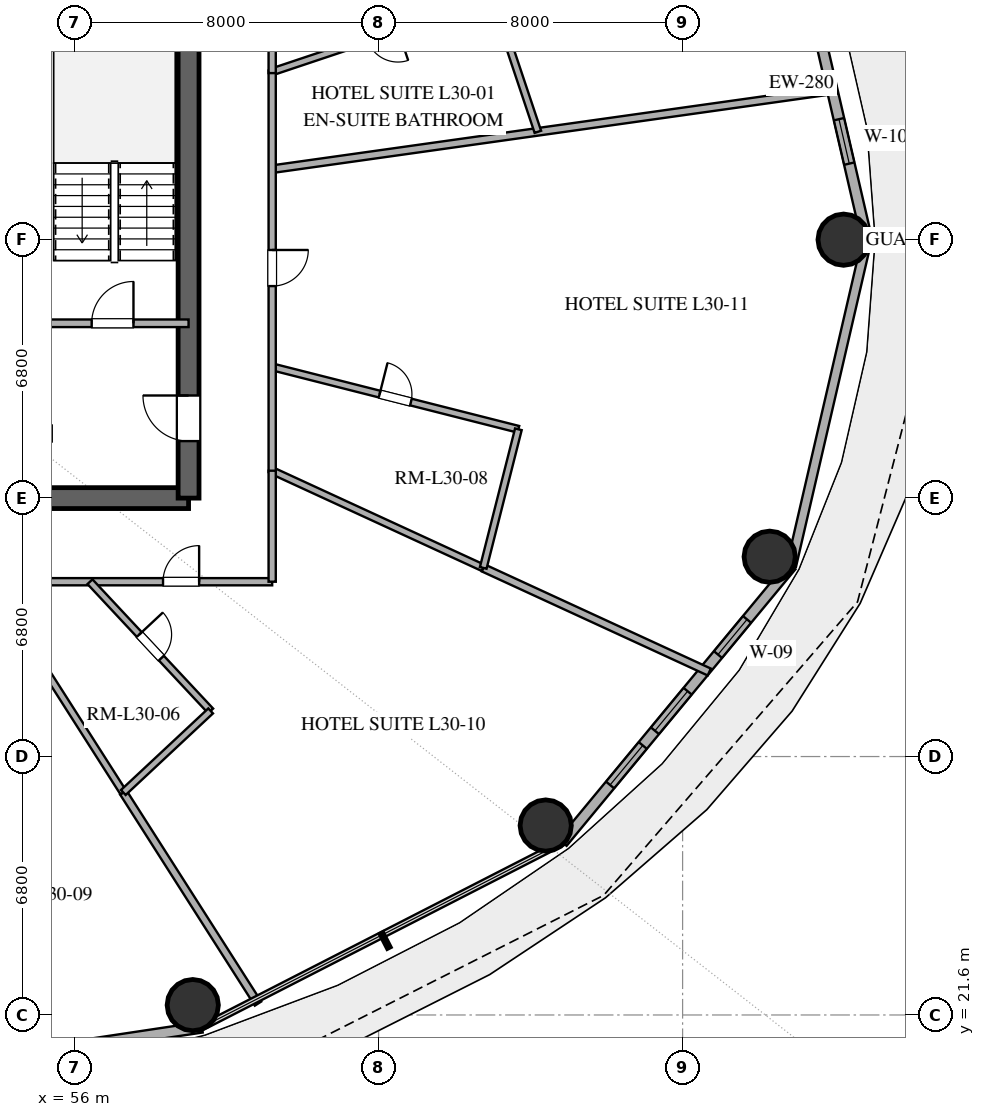
"""IFC4 building model, lengths in metres.
Left out: names, types, materials, properties, quantities, classifications, styles, units other than length and angle.
Written with IfcOpenShell. Run it as: python <this file> out.ifc"""

import sys

from ifc_helpers import new_model, si_unit, direction, frame, frame_2d, origin, origin_2d, place, context, subcontext, project, spatial, rectangle, hollow_circle, extrude, element, fill, save


model = new_model("IFC4")
c1 = context("Model", 3, precision=1e-05, world=origin(), true_north=direction((0.0, 1.0)))
c2 = subcontext(c1, "Body", "Model", "MODEL_VIEW")
j1 = project(units=[si_unit("LENGTHUNIT", "METRE"), si_unit("PLANEANGLEUNIT", "RADIAN")], contexts=[c1])
p1 = place(None, origin())
s1 = spatial("IfcSite", under=j1, at=p1, CompositionType="ELEMENT")
p2 = place(p1, origin())
s2 = spatial("IfcBuilding", under=s1, at=p2, CompositionType="ELEMENT")
p3 = place(p2, frame((0.0, 0.0, 120.0)))
s3 = spatial("IfcBuildingStorey", under=s2, at=p3, CompositionType="ELEMENT", Elevation=120.0)
p4 = place(p3, frame((55.0, 35.2, 0.0), z_axis=(0.0, 0.0, 1.0), x_axis=(1.0, 0.0, 0.0)))
e1 = element("IfcWall", 1, at=p4, inside=s3, PredefinedType="SHEAR", context=c2, shape_type="SweptSolid", body=[
    extrude(rectangle(XDim=4.0, YDim=0.55, at=frame_2d((2.0, 0.0))), origin(), (0.0, 0.0, 1.0), 3.38),
])
p5 = place(p3, frame((59.0, 35.2, 0.0), z_axis=(0.0, 0.0, 1.0), x_axis=(0.0, 1.0, 0.0)))
e2 = element("IfcWall", 2, at=p5, inside=s3, PredefinedType="SHEAR", context=c2, shape_type="SweptSolid", body=[
    extrude(rectangle(XDim=13.6, YDim=0.55, at=frame_2d((6.8, 0.0))), origin(), (0.0, 0.0, 1.0), 3.38),
])
p6 = place(p5, frame((1.5, 0.0, 0.0)))
e3 = element("IfcOpeningElement", 3, at=p6, cuts=e2, PredefinedType="OPENING", context=c2, shape_type="SweptSolid", body=[
    extrude(rectangle(XDim=1.2, YDim=2.15, at=frame_2d((0.6, 1.075))), frame((0.0, 0.285, 0.0), z_axis=(0.0, -1.0, 0.0), x_axis=(1.0, 0.0, 0.0)), (0.0, 0.0, 1.0), 0.57),
])
for number, where, z_axis, x_axis in (
    (4, (76.237, 42.0, 0.0), (0.0, 0.0, 1.0), (1.0, 0.0, 0.0)),
    (5, (59.11, 21.859, 0.0), (0.0, 0.0, 1.0), (1.0, 0.0, 0.0)),
    (6, (68.398, 26.585, 0.0), (0.0, 0.0, 1.0), (1.0, 0.0, 0.0)),
    (7, (74.291, 33.657, 0.0), (0.0, 0.0, 1.0), (1.0, 0.0, 0.0)),
):
    element("IfcColumn", number, at=place(p3, frame(where, z_axis=z_axis, x_axis=x_axis)), inside=s3, PredefinedType="COLUMN", context=c2, shape_type="SweptSolid", body=[
        extrude(hollow_circle(Radius=0.675, WallThickness=0.036, at=origin_2d()), origin(), (0.0, 0.0, 1.0), 3.38),
    ])
p7 = place(p3, frame((76.849, 42.0, 0.0), z_axis=(0.0, 0.0, 1.0), x_axis=(-0.22558597182, 0.974223264616, 0.0)))
e8 = element("IfcWall", 8, at=p7, inside=s3, PredefinedType="SOLIDWALL", context=c2, shape_type="SweptSolid", body=[
    extrude(rectangle(XDim=8.811, YDim=0.28, at=frame_2d((4.405, 0.0))), origin(), (0.0, 0.0, 1.0), 3.38),
])
p8 = place(p7, frame((2.054, 0.0, 0.85)))
e9 = element("IfcOpeningElement", 9, at=p8, cuts=e8, PredefinedType="OPENING", context=c2, shape_type="SweptSolid", body=[
    extrude(rectangle(XDim=1.2, YDim=1.6, at=frame_2d((0.6, 0.8))), frame((0.0, 0.15, 0.0), z_axis=(0.0, -1.0, 0.0), x_axis=(1.0, 0.0, 0.0)), (0.0, 0.0, 1.0), 0.3),
])
p9 = place(p7, frame((6.175, 0.0, 0.0)))
e10 = element("IfcOpeningElement", 10, at=p9, cuts=e8, PredefinedType="OPENING", context=c2, shape_type="SweptSolid", body=[
    extrude(rectangle(XDim=1.1, YDim=2.25, at=frame_2d((0.55, 1.125))), frame((0.0, 0.15, 0.0), z_axis=(0.0, -1.0, 0.0), x_axis=(1.0, 0.0, 0.0)), (0.0, 0.0, 1.0), 0.3),
])
p10 = place(p3, frame((48.0, 19.57, 0.0), z_axis=(0.0, 0.0, 1.0), x_axis=(0.988877774656, 0.148730450117, 0.0)))
e11 = element("IfcWall", 11, at=p10, inside=s3, PredefinedType="SOLIDWALL", context=c2, shape_type="SweptSolid", body=[
    extrude(rectangle(XDim=11.479, YDim=0.28, at=frame_2d((5.74, 0.0))), origin(), (0.0, 0.0, 1.0), 3.38),
])
p11 = place(p10, frame((1.524, 0.0, 0.0)))
e12 = element("IfcOpeningElement", 12, at=p11, cuts=e11, PredefinedType="OPENING", context=c2, shape_type="SweptSolid", body=[
    extrude(rectangle(XDim=1.4, YDim=2.2, at=frame_2d((0.7, 1.1))), frame((0.0, 0.15, 0.0), z_axis=(0.0, -1.0, 0.0), x_axis=(1.0, 0.0, 0.0)), (0.0, 0.0, 1.0), 0.3),
])
p12 = place(p3, frame((68.84, 26.14, 0.0), z_axis=(0.0, 0.0, 1.0), x_axis=(0.637505817448, 0.770445541696, 0.0)))
e13 = element("IfcWall", 13, at=p12, inside=s3, PredefinedType="SOLIDWALL", context=c2, shape_type="SweptSolid", body=[
    extrude(rectangle(XDim=9.445, YDim=0.28, at=frame_2d((4.723, 0.0))), origin(), (0.0, 0.0, 1.0), 3.38),
])
p13 = place(p12, frame((1.963, 0.0, 0.85)))
e14 = element("IfcOpeningElement", 14, at=p13, cuts=e13, PredefinedType="OPENING", context=c2, shape_type="SweptSolid", body=[
    extrude(rectangle(XDim=1.35, YDim=1.8, at=frame_2d((0.675, 0.9))), frame((0.0, 0.15, 0.0), z_axis=(0.0, -1.0, 0.0), x_axis=(1.0, 0.0, 0.0)), (0.0, 0.0, 1.0), 0.3),
])
p14 = place(p12, frame((3.815, 0.0, 0.85)))
e15 = element("IfcOpeningElement", 15, at=p14, cuts=e13, PredefinedType="OPENING", context=c2, shape_type="SweptSolid", body=[
    extrude(rectangle(XDim=1.35, YDim=1.8, at=frame_2d((0.675, 0.9))), frame((0.0, 0.15, 0.0), z_axis=(0.0, -1.0, 0.0), x_axis=(1.0, 0.0, 0.0)), (0.0, 0.0, 1.0), 0.3),
])
p15 = place(p12, frame((6.417, 0.0, 0.85)))
e16 = element("IfcOpeningElement", 16, at=p15, cuts=e13, PredefinedType="OPENING", context=c2, shape_type="SweptSolid", body=[
    extrude(rectangle(XDim=1.2, YDim=1.8, at=frame_2d((0.6, 0.9))), frame((0.0, 0.15, 0.0), z_axis=(0.0, -1.0, 0.0), x_axis=(1.0, 0.0, 0.0)), (0.0, 0.0, 1.0), 0.3),
])
p16 = place(p3, frame((74.861, 33.417, 0.0), z_axis=(0.0, 0.0, 1.0), x_axis=(0.22558597182, 0.974223264616, 0.0)))
e17 = element("IfcWall", 17, at=p16, inside=s3, PredefinedType="SOLIDWALL", context=c2, shape_type="SweptSolid", body=[
    extrude(rectangle(XDim=8.811, YDim=0.25, at=frame_2d((4.405, 0.0))), origin(), (0.0, 0.0, 1.0), 3.38),
])
p17 = place(p3, frame((55.0, 39.8, 0.0), z_axis=(0.0, 0.0, 1.0), x_axis=(1.0, 0.0, 0.0)))
e18 = element("IfcWall", 18, at=p17, inside=s3, PredefinedType="SOLIDWALL", context=c2, shape_type="SweptSolid", body=[
    extrude(rectangle(XDim=4.0, YDim=0.2, at=frame_2d((2.0, 0.0))), origin(), (0.0, 0.0, 1.0), 2.74),
])
p18 = place(p17, frame((1.45, 0.0, 0.0)))
e19 = element("IfcOpeningElement", 19, at=p18, cuts=e18, PredefinedType="OPENING", context=c2, shape_type="SweptSolid", body=[
    extrude(rectangle(XDim=1.1, YDim=2.15, at=frame_2d((0.55, 1.075))), frame((0.0, 0.11, 0.0), z_axis=(0.0, -1.0, 0.0), x_axis=(1.0, 0.0, 0.0)), (0.0, 0.0, 1.0), 0.22),
])
p19 = place(p3, frame((61.2, 43.855, 0.0), z_axis=(0.0, 0.0, 1.0), x_axis=(0.990266848234, 0.139181785048, 0.0)))
e20 = element("IfcWall", 20, at=p19, inside=s3, PredefinedType="PARTITIONING", context=c2, shape_type="SweptSolid", body=[
    extrude(rectangle(XDim=15.005, YDim=0.2, at=frame_2d((7.502, 0.0))), origin(), (0.0, 0.0, 1.0), 2.74),
])
p20 = place(p3, frame((61.2, 38.653, 0.0), z_axis=(0.0, 0.0, 1.0), x_axis=(0.96932048276, -0.24580032893, 0.0)))
e21 = element("IfcWall", 21, at=p20, inside=s3, PredefinedType="PLUMBINGWALL", context=c2, shape_type="SweptSolid", body=[
    extrude(rectangle(XDim=6.684, YDim=0.18, at=frame_2d((3.342, 0.0))), origin(), (0.0, 0.0, 1.0), 2.74),
])
p21 = place(p20, frame((2.917, 0.0, 0.0)))
e22 = element("IfcOpeningElement", 22, at=p21, cuts=e21, PredefinedType="OPENING", context=c2, shape_type="SweptSolid", body=[
    extrude(rectangle(XDim=0.85, YDim=2.1, at=frame_2d((0.425, 1.05))), frame((0.0, 0.1, 0.0), z_axis=(0.0, -1.0, 0.0), x_axis=(1.0, 0.0, 0.0)), (0.0, 0.0, 1.0), 0.2),
])
p22 = place(p3, frame((60.828, 21.9, 0.0), z_axis=(0.0, 0.0, 1.0), x_axis=(-0.537968238966, 0.842965108331, 0.0)))
e23 = element("IfcWall", 23, at=p22, inside=s3, PredefinedType="PARTITIONING", context=c2, shape_type="SweptSolid", body=[
    extrude(rectangle(XDim=6.589, YDim=0.2, at=frame_2d((3.295, 0.0))), origin(), (0.0, 0.0, 1.0), 2.74),
])
p23 = place(p3, frame((57.283, 27.454, 0.0), z_axis=(0.0, 0.0, 1.0), x_axis=(-0.537984400251, 0.842954794213, 0.0)))
e24 = element("IfcWall", 24, at=p23, inside=s3, PredefinedType="PLUMBINGWALL", context=c2, shape_type="SweptSolid", body=[
    extrude(rectangle(XDim=6.579, YDim=0.18, at=frame_2d((3.29, 0.0))), origin(), (0.0, 0.0, 1.0), 2.74),
])
p24 = place(p3, frame((72.701, 30.624, 0.0), z_axis=(0.0, 0.0, 1.0), x_axis=(-0.9083071886, 0.418303778536, 0.0)))
e25 = element("IfcWall", 25, at=p24, inside=s3, PredefinedType="PARTITIONING", context=c2, shape_type="SweptSolid", body=[
    extrude(rectangle(XDim=6.548, YDim=0.2, at=frame_2d((3.274, 0.0))), origin(), (0.0, 0.0, 1.0), 2.74),
])
p25 = place(p3, frame((67.012, 48.361, 0.0), z_axis=(0.0, 0.0, 1.0), x_axis=(-0.948332174456, -0.317279193915, 0.0)))
e26 = element("IfcWall", 26, at=p25, inside=s3, PredefinedType="PLUMBINGWALL", context=c2, shape_type="SweptSolid", body=[
    extrude(rectangle(XDim=6.129, YDim=0.18, at=frame_2d((3.064, 0.0))), origin(), (0.0, 0.0, 1.0), 2.74),
])
p26 = place(p25, frame((2.639, 0.0, 0.0)))
e27 = element("IfcOpeningElement", 27, at=p26, cuts=e26, PredefinedType="OPENING", context=c2, shape_type="SweptSolid", body=[
    extrude(rectangle(XDim=0.85, YDim=2.1, at=frame_2d((0.425, 1.05))), frame((0.0, 0.1, 0.0), z_axis=(0.0, -1.0, 0.0), x_axis=(1.0, 0.0, 0.0)), (0.0, 0.0, 1.0), 0.2),
])
p27 = place(p3, frame((66.754, 33.363, 0.0), z_axis=(0.0, 0.0, 1.0), x_axis=(-0.908301480607, 0.418316172681, 0.0)))
e28 = element("IfcWall", 28, at=p27, inside=s3, PredefinedType="PLUMBINGWALL", context=c2, shape_type="SweptSolid", body=[
    extrude(rectangle(XDim=6.115, YDim=0.18, at=frame_2d((3.057, 0.0))), origin(), (0.0, 0.0, 1.0), 2.74),
])
p28 = place(p3, frame((61.2, 46.45, 0.0), z_axis=(0.0, 0.0, 1.0), x_axis=(0.0, -1.0, 0.0)))
e29 = element("IfcWall", 29, at=p28, inside=s3, PredefinedType="PARTITIONING", context=c2, shape_type="SweptSolid", body=[
    extrude(rectangle(XDim=10.564, YDim=0.19, at=frame_2d((5.282, 0.0))), origin(), (0.0, 0.0, 1.0), 2.74),
])
p29 = place(p28, frame((4.722, 0.0, 0.0)))
e30 = element("IfcOpeningElement", 30, at=p29, cuts=e29, PredefinedType="OPENING", context=c2, shape_type="SweptSolid", body=[
    extrude(rectangle(XDim=0.95, YDim=2.15, at=frame_2d((0.475, 1.075))), frame((0.0, 0.105, 0.0), z_axis=(0.0, -1.0, 0.0), x_axis=(1.0, 0.0, 0.0)), (0.0, 0.0, 1.0), 0.21),
])
p30 = place(p3, frame((53.706, 33.0, 0.0), z_axis=(0.0, 0.0, 1.0), x_axis=(1.0, 0.0, 0.0)))
e31 = element("IfcWall", 31, at=p30, inside=s3, PredefinedType="PARTITIONING", context=c2, shape_type="SweptSolid", body=[
    extrude(rectangle(XDim=7.494, YDim=0.19, at=frame_2d((3.747, 0.0))), origin(), (0.0, 0.0, 1.0), 2.74),
])
p31 = place(p30, frame((4.622, 0.0, 0.0)))
e32 = element("IfcOpeningElement", 32, at=p31, cuts=e31, PredefinedType="OPENING", context=c2, shape_type="SweptSolid", body=[
    extrude(rectangle(XDim=0.95, YDim=2.15, at=frame_2d((0.475, 1.075))), frame((0.0, 0.105, 0.0), z_axis=(0.0, -1.0, 0.0), x_axis=(1.0, 0.0, 0.0)), (0.0, 0.0, 1.0), 0.21),
])
p32 = place(p3, frame((56.406, 33.0, 0.0), z_axis=(0.0, 0.0, 1.0), x_axis=(0.682578142961, -0.730812615348, 0.0)))
e33 = element("IfcWall", 33, at=p32, inside=s3, PredefinedType="PLUMBINGWALL", context=c2, shape_type="SweptSolid", body=[
    extrude(rectangle(XDim=4.652, YDim=0.18, at=frame_2d((2.326, 0.0))), origin(), (0.0, 0.0, 1.0), 2.74),
])
p33 = place(p32, frame((1.901, 0.0, 0.0)))
e34 = element("IfcOpeningElement", 34, at=p33, cuts=e33, PredefinedType="OPENING", context=c2, shape_type="SweptSolid", body=[
    extrude(rectangle(XDim=0.85, YDim=2.1, at=frame_2d((0.425, 1.05))), frame((0.0, 0.1, 0.0), z_axis=(0.0, -1.0, 0.0), x_axis=(1.0, 0.0, 0.0)), (0.0, 0.0, 1.0), 0.2),
])
p34 = place(p3, frame((61.2, 51.0, 0.0), z_axis=(0.0, 0.0, 1.0), x_axis=(0.0, -1.0, 0.0)))
e35 = element("IfcWall", 35, at=p34, inside=s3, PredefinedType="PARTITIONING", context=c2, shape_type="SweptSolid", body=[
    extrude(rectangle(XDim=4.617, YDim=0.19, at=frame_2d((2.309, 0.0))), origin(), (0.0, 0.0, 1.0), 2.74),
])
p35 = place(p34, frame((1.833, 0.0, 0.0)))
e36 = element("IfcOpeningElement", 36, at=p35, cuts=e35, PredefinedType="OPENING", context=c2, shape_type="SweptSolid", body=[
    extrude(rectangle(XDim=0.95, YDim=2.15, at=frame_2d((0.475, 1.075))), frame((0.0, 0.105, 0.0), z_axis=(0.0, -1.0, 0.0), x_axis=(1.0, 0.0, 0.0)), (0.0, 0.0, 1.0), 0.21),
])
p36 = place(p3, frame((67.678, 37.01, 0.0), z_axis=(0.0, 0.0, 1.0), x_axis=(-0.245725202551, -0.969339530212, 0.0)))
e37 = element("IfcWall", 37, at=p36, inside=s3, PredefinedType="PLUMBINGWALL", context=c2, shape_type="SweptSolid", body=[
    extrude(rectangle(XDim=3.763, YDim=0.18, at=frame_2d((1.881, 0.0))), origin(), (0.0, 0.0, 1.0), 2.74),
])
p37 = place(p3, frame((68.191, 44.838, 0.0), z_axis=(0.0, 0.0, 1.0), x_axis=(-0.317291996527, 0.948327891048, 0.0)))
e38 = element("IfcWall", 38, at=p37, inside=s3, PredefinedType="PLUMBINGWALL", context=c2, shape_type="SweptSolid", body=[
    extrude(rectangle(XDim=3.716, YDim=0.18, at=frame_2d((1.858, 0.0))), origin(), (0.0, 0.0, 1.0), 2.74),
])
p38 = place(p3, frame((59.581, 29.601, 0.0), z_axis=(0.0, 0.0, 1.0), x_axis=(-0.730840933831, -0.682547822088, 0.0)))
e39 = element("IfcWall", 39, at=p38, inside=s3, PredefinedType="PLUMBINGWALL", context=c2, shape_type="SweptSolid", body=[
    extrude(rectangle(XDim=3.145, YDim=0.18, at=frame_2d((1.572, 0.0))), origin(), (0.0, 0.0, 1.0), 2.74),
])
p39 = place(p3, frame((61.2, 33.0, 0.0), z_axis=(0.0, 0.0, 1.0), x_axis=(0.0, 1.0, 0.0)))
e40 = element("IfcWall", 40, at=p39, inside=s3, PredefinedType="PARTITIONING", context=c2, shape_type="SweptSolid", body=[
    extrude(rectangle(XDim=2.921, YDim=0.19, at=frame_2d((1.46, 0.0))), origin(), (0.0, 0.0, 1.0), 2.74),
])
p40 = place(p8, origin())
e41 = element("IfcWindow", 41, at=p40, inside=s3, PartitioningType="SINGLE_PANEL", PredefinedType="WINDOW", context=c2, shape_type="SweptSolid", body=[
    extrude(rectangle(XDim=1.2, YDim=1.6, at=frame_2d((0.6, 0.8))), frame((0.0, 0.03, 0.0), z_axis=(0.0, -1.0, 0.0), x_axis=(1.0, 0.0, 0.0)), (0.0, 0.0, 1.0), 0.06),
])
fill(e9, e41)
p41 = place(p13, origin())
e42 = element("IfcWindow", 42, at=p41, inside=s3, PartitioningType="SINGLE_PANEL", PredefinedType="WINDOW", context=c2, shape_type="SweptSolid", body=[
    extrude(rectangle(XDim=1.35, YDim=1.8, at=frame_2d((0.675, 0.9))), frame((0.0, 0.03, 0.0), z_axis=(0.0, -1.0, 0.0), x_axis=(1.0, 0.0, 0.0)), (0.0, 0.0, 1.0), 0.06),
])
fill(e14, e42)
p42 = place(p14, origin())
e43 = element("IfcWindow", 43, at=p42, inside=s3, PartitioningType="SINGLE_PANEL", PredefinedType="WINDOW", context=c2, shape_type="SweptSolid", body=[
    extrude(rectangle(XDim=1.35, YDim=1.8, at=frame_2d((0.675, 0.9))), frame((0.0, 0.03, 0.0), z_axis=(0.0, -1.0, 0.0), x_axis=(1.0, 0.0, 0.0)), (0.0, 0.0, 1.0), 0.06),
])
fill(e15, e43)
p43 = place(p15, origin())
e44 = element("IfcWindow", 44, at=p43, inside=s3, PartitioningType="SINGLE_PANEL", PredefinedType="WINDOW", context=c2, shape_type="SweptSolid", body=[
    extrude(rectangle(XDim=1.2, YDim=1.8, at=frame_2d((0.6, 0.9))), frame((0.0, 0.03, 0.0), z_axis=(0.0, -1.0, 0.0), x_axis=(1.0, 0.0, 0.0)), (0.0, 0.0, 1.0), 0.06),
])
fill(e16, e44)
p44 = place(p6, origin())
e45 = element("IfcDoor", 45, at=p44, inside=s3, OperationType="SINGLE_SWING_RIGHT", PredefinedType="DOOR", context=c2, shape_type="SweptSolid", body=[
    extrude(rectangle(XDim=1.2, YDim=2.15, at=frame_2d((0.6, 1.075))), frame((0.0, 0.025, 0.0), z_axis=(0.0, -1.0, 0.0), x_axis=(1.0, 0.0, 0.0)), (0.0, 0.0, 1.0), 0.05),
])
fill(e3, e45)
p45 = place(p18, origin())
e46 = element("IfcDoor", 46, at=p45, inside=s3, OperationType="SINGLE_SWING_RIGHT", PredefinedType="DOOR", context=c2, shape_type="SweptSolid", body=[
    extrude(rectangle(XDim=1.1, YDim=2.15, at=frame_2d((0.55, 1.075))), frame((0.0, 0.025, 0.0), z_axis=(0.0, -1.0, 0.0), x_axis=(1.0, 0.0, 0.0)), (0.0, 0.0, 1.0), 0.05),
])
fill(e19, e46)
p46 = place(p21, origin())
e47 = element("IfcDoor", 47, at=p46, inside=s3, OperationType="SINGLE_SWING_LEFT", PredefinedType="DOOR", context=c2, shape_type="SweptSolid", body=[
    extrude(rectangle(XDim=0.85, YDim=2.1, at=frame_2d((0.425, 1.05))), frame((0.0, 0.025, 0.0), z_axis=(0.0, -1.0, 0.0), x_axis=(1.0, 0.0, 0.0)), (0.0, 0.0, 1.0), 0.05),
])
fill(e22, e47)
p47 = place(p29, origin())
e48 = element("IfcDoor", 48, at=p47, inside=s3, OperationType="SINGLE_SWING_LEFT", PredefinedType="DOOR", context=c2, shape_type="SweptSolid", body=[
    extrude(rectangle(XDim=0.95, YDim=2.15, at=frame_2d((0.475, 1.075))), frame((0.0, 0.025, 0.0), z_axis=(0.0, -1.0, 0.0), x_axis=(1.0, 0.0, 0.0)), (0.0, 0.0, 1.0), 0.05),
])
fill(e30, e48)
p48 = place(p31, origin())
e49 = element("IfcDoor", 49, at=p48, inside=s3, OperationType="SINGLE_SWING_RIGHT", PredefinedType="DOOR", context=c2, shape_type="SweptSolid", body=[
    extrude(rectangle(XDim=0.95, YDim=2.15, at=frame_2d((0.475, 1.075))), frame((0.0, 0.025, 0.0), z_axis=(0.0, -1.0, 0.0), x_axis=(1.0, 0.0, 0.0)), (0.0, 0.0, 1.0), 0.05),
])
fill(e32, e49)
p49 = place(p33, origin())
e50 = element("IfcDoor", 50, at=p49, inside=s3, OperationType="SINGLE_SWING_LEFT", PredefinedType="DOOR", context=c2, shape_type="SweptSolid", body=[
    extrude(rectangle(XDim=0.85, YDim=2.1, at=frame_2d((0.425, 1.05))), frame((0.0, 0.025, 0.0), z_axis=(0.0, -1.0, 0.0), x_axis=(1.0, 0.0, 0.0)), (0.0, 0.0, 1.0), 0.05),
])
fill(e34, e50)
save(model, sys.argv[1])
